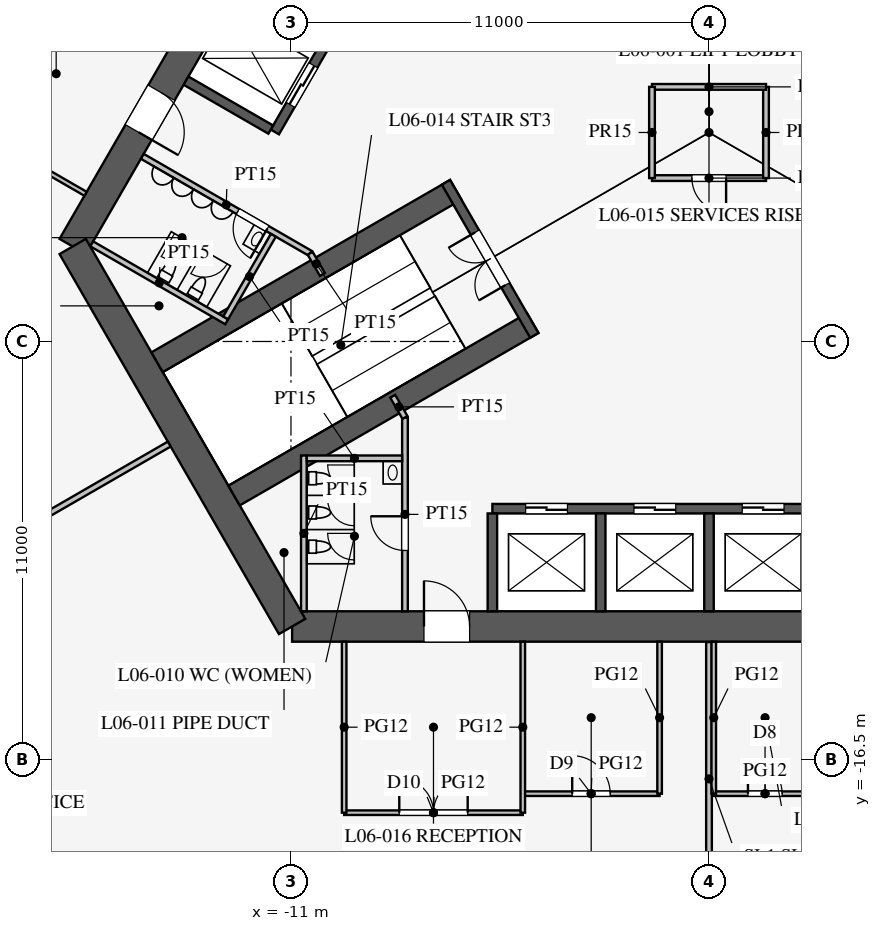
"""IFC4 building model, lengths in metres.
Left out: names, types, materials, properties, quantities, classifications, styles, units other than length and angle.
Written with IfcOpenShell. Run it as: python <this file> out.ifc"""

import sys

from ifc_helpers import new_model, si_unit, direction, frame, frame_2d, origin, place, context, subcontext, project, spatial, rectangle, extrude, element, fill, save


model = new_model("IFC4")
c1 = context("Model", 3, precision=1e-05, world=origin(), true_north=direction((0.0, 1.0)))
c2 = subcontext(c1, "Body", "Model", "MODEL_VIEW")
j1 = project(units=[si_unit("LENGTHUNIT", "METRE"), si_unit("PLANEANGLEUNIT", "RADIAN")], contexts=[c1])
p1 = place(None, origin())
s1 = spatial("IfcSite", under=j1, at=p1, CompositionType="ELEMENT")
p2 = place(p1, origin())
s2 = spatial("IfcBuilding", under=s1, at=p2, CompositionType="ELEMENT")
p3 = place(p2, frame((0.0, 0.0, 29.1)))
s3 = spatial("IfcBuildingStorey", under=s2, at=p3, CompositionType="ELEMENT", Elevation=29.1)
p4 = place(p3, frame((-10.97, -13.0, 0.0), z_axis=(0.0, 0.0, 1.0), x_axis=(1.0, 0.0, 0.0)))
e1 = element("IfcWall", 1, at=p4, inside=s3, PredefinedType="SHEAR", context=c2, shape_type="SweptSolid", body=[
    extrude(rectangle(XDim=21.939, YDim=0.8, at=frame_2d((10.97, 0.0))), origin(), (0.0, 0.0, 1.0), 4.2),
])
p5 = place(p4, frame((17.27, 0.0, 0.0)))
e2 = element("IfcOpeningElement", 2, at=p5, cuts=e1, PredefinedType="OPENING", context=c2, shape_type="SweptSolid", body=[
    extrude(rectangle(XDim=1.2, YDim=2.1, at=frame_2d((0.6, 1.05))), frame((0.0, 0.41, 0.0), z_axis=(0.0, -1.0, 0.0), x_axis=(1.0, 0.0, 0.0)), (0.0, 0.0, 1.0), 0.82),
])
p6 = place(p4, frame((3.47, 0.0, 0.0)))
e3 = element("IfcOpeningElement", 3, at=p6, cuts=e1, PredefinedType="OPENING", context=c2, shape_type="SweptSolid", body=[
    extrude(rectangle(XDim=1.2, YDim=2.1, at=frame_2d((0.6, 1.05))), frame((0.0, 0.41, 0.0), z_axis=(0.0, -1.0, 0.0), x_axis=(1.0, 0.0, 0.0)), (0.0, 0.0, 1.0), 0.82),
])
p7 = place(p3, frame((-5.773, 16.0, 0.0), z_axis=(0.0, 0.0, 1.0), x_axis=(-0.500002442456, -0.866023993627, 0.0)))
e4 = element("IfcWall", 4, at=p7, inside=s3, PredefinedType="SHEAR", context=c2, shape_type="SweptSolid", body=[
    extrude(rectangle(XDim=21.939, YDim=0.8, at=frame_2d((10.97, 0.0))), origin(), (0.0, 0.0, 1.0), 4.2),
])
p8 = place(p7, frame((17.27, 0.0, 0.0)))
e5 = element("IfcOpeningElement", 5, at=p8, cuts=e4, PredefinedType="OPENING", context=c2, shape_type="SweptSolid", body=[
    extrude(rectangle(XDim=1.2, YDim=2.1, at=frame_2d((0.6, 1.05))), frame((0.0, 0.41, 0.0), z_axis=(0.0, -1.0, 0.0), x_axis=(1.0, 0.0, 0.0)), (0.0, 0.0, 1.0), 0.82),
])
p9 = place(p7, frame((3.47, 0.0, 0.0)))
e6 = element("IfcOpeningElement", 6, at=p9, cuts=e4, PredefinedType="OPENING", context=c2, shape_type="SweptSolid", body=[
    extrude(rectangle(XDim=1.2, YDim=2.1, at=frame_2d((0.6, 1.05))), frame((0.0, 0.41, 0.0), z_axis=(0.0, -1.0, 0.0), x_axis=(1.0, 0.0, 0.0)), (0.0, 0.0, 1.0), 0.82),
])
p10 = place(p3, frame((-16.743, -3.0, 0.0), z_axis=(0.0, 0.0, 1.0), x_axis=(0.499995765644, -0.866027848477, 0.0)))
e7 = element("IfcWall", 7, at=p10, inside=s3, PredefinedType="SHEAR", context=c2, shape_type="SweptSolid", body=[
    extrude(rectangle(XDim=11.547, YDim=0.8, at=frame_2d((5.773, 0.0))), origin(), (0.0, 0.0, 1.0), 4.2),
])
p11 = place(p3, frame((-5.7, -9.9, 0.0), z_axis=(0.0, 0.0, 1.0), x_axis=(1.0, 0.0, 0.0)))
e8 = element("IfcWall", 8, at=p11, inside=s3, PredefinedType="SHEAR", context=c2, shape_type="SweptSolid", body=[
    extrude(rectangle(XDim=11.4, YDim=0.25, at=frame_2d((5.7, 0.0))), origin(), (0.0, 0.0, 1.0), 4.2),
])
p12 = place(p11, frame((0.875, 0.0, 0.0)))
e9 = element("IfcOpeningElement", 9, at=p12, cuts=e8, PredefinedType="OPENING", context=c2, shape_type="SweptSolid", body=[
    extrude(rectangle(XDim=1.1, YDim=2.2, at=frame_2d((0.55, 1.1))), frame((0.0, 0.135, 0.0), z_axis=(0.0, -1.0, 0.0), x_axis=(1.0, 0.0, 0.0)), (0.0, 0.0, 1.0), 0.27),
])
p13 = place(p11, frame((3.725, 0.0, 0.0)))
e10 = element("IfcOpeningElement", 10, at=p13, cuts=e8, PredefinedType="OPENING", context=c2, shape_type="SweptSolid", body=[
    extrude(rectangle(XDim=1.1, YDim=2.2, at=frame_2d((0.55, 1.1))), frame((0.0, 0.135, 0.0), z_axis=(0.0, -1.0, 0.0), x_axis=(1.0, 0.0, 0.0)), (0.0, 0.0, 1.0), 0.27),
])
p14 = place(p11, frame((6.575, 0.0, 0.0)))
e11 = element("IfcOpeningElement", 11, at=p14, cuts=e8, PredefinedType="OPENING", context=c2, shape_type="SweptSolid", body=[
    extrude(rectangle(XDim=1.1, YDim=2.2, at=frame_2d((0.55, 1.1))), frame((0.0, 0.135, 0.0), z_axis=(0.0, -1.0, 0.0), x_axis=(1.0, 0.0, 0.0)), (0.0, 0.0, 1.0), 0.27),
])
p15 = place(p11, frame((9.425, 0.0, 0.0)))
e12 = element("IfcOpeningElement", 12, at=p15, cuts=e8, PredefinedType="OPENING", context=c2, shape_type="SweptSolid", body=[
    extrude(rectangle(XDim=1.1, YDim=2.2, at=frame_2d((0.55, 1.1))), frame((0.0, 0.135, 0.0), z_axis=(0.0, -1.0, 0.0), x_axis=(1.0, 0.0, 0.0)), (0.0, 0.0, 1.0), 0.27),
])
for number, where, z_axis, x_axis in (
    (13, (-5.7, -10.025, 0.0), (0.0, 0.0, 1.0), (0.0, -1.0, 0.0)),
    (14, (-2.85, -10.025, 0.0), (0.0, 0.0, 1.0), (0.0, -1.0, 0.0)),
    (15, (0.0, -10.025, 0.0), (0.0, 0.0, 1.0), (0.0, -1.0, 0.0)),
):
    element("IfcWall", number, at=place(p3, frame(where, z_axis=z_axis, x_axis=x_axis)), inside=s3, PredefinedType="SHEAR", context=c2, shape_type="SweptSolid", body=[
        extrude(rectangle(XDim=2.575, YDim=0.25, at=frame_2d((1.288, 0.0))), origin(), (0.0, 0.0, 1.0), 4.2),
    ])
p16 = place(p3, frame((-5.724, 9.886, 0.0), z_axis=(0.0, 0.0, 1.0), x_axis=(-0.500001763848, -0.866024385424, 0.0)))
e16 = element("IfcWall", 16, at=p16, inside=s3, PredefinedType="SHEAR", context=c2, shape_type="SweptSolid", body=[
    extrude(rectangle(XDim=11.4, YDim=0.25, at=frame_2d((5.7, 0.0))), origin(), (0.0, 0.0, 1.0), 4.2),
])
p17 = place(p16, frame((6.525, 0.0, 0.0)))
e17 = element("IfcOpeningElement", 17, at=p17, cuts=e16, PredefinedType="OPENING", context=c2, shape_type="SweptSolid", body=[
    extrude(rectangle(XDim=1.2, YDim=2.2, at=frame_2d((0.6, 1.1))), frame((0.0, 0.135, 0.0), z_axis=(0.0, -1.0, 0.0), x_axis=(1.0, 0.0, 0.0)), (0.0, 0.0, 1.0), 0.27),
])
p18 = place(p16, frame((9.375, 0.0, 0.0)))
e18 = element("IfcOpeningElement", 18, at=p18, cuts=e16, PredefinedType="OPENING", context=c2, shape_type="SweptSolid", body=[
    extrude(rectangle(XDim=1.2, YDim=2.2, at=frame_2d((0.6, 1.1))), frame((0.0, 0.135, 0.0), z_axis=(0.0, -1.0, 0.0), x_axis=(1.0, 0.0, 0.0)), (0.0, 0.0, 1.0), 0.27),
])
p19 = place(p3, frame((-11.532, 0.076, 0.0), z_axis=(0.0, 0.0, 1.0), x_axis=(-0.866005588531, 0.500034319456, 0.0)))
e19 = element("IfcWall", 19, at=p19, inside=s3, PredefinedType="SHEAR", context=c2, shape_type="SweptSolid", body=[
    extrude(rectangle(XDim=2.575, YDim=0.25, at=frame_2d((1.288, 0.0))), origin(), (0.0, 0.0, 1.0), 4.2),
])
for number, where, z_axis, x_axis in (
    (20, (-6.663, -1.509, 0.0), (0.0, 0.0, 1.0), (-0.866, -0.5, 0.0)),
    (21, (-4.638, -5.016, 0.0), (0.0, 0.0, 1.0), (-0.866, -0.5, 0.0)),
):
    element("IfcWall", number, at=place(p3, frame(where, z_axis=z_axis, x_axis=x_axis)), inside=s3, PredefinedType="SHEAR", context=c2, shape_type="SweptSolid", body=[
        extrude(rectangle(XDim=9.075, YDim=0.6, at=frame_2d((4.538, 0.0))), origin(), (0.0, 0.0, 1.0), 4.2),
    ])
p20 = place(p3, frame((-6.922, -1.312, 0.0), z_axis=(0.0, 0.0, 1.0), x_axis=(0.499984536904, -0.866034331223, 0.0)))
e22 = element("IfcWall", 22, at=p20, inside=s3, PredefinedType="SHEAR", context=c2, shape_type="SweptSolid", body=[
    extrude(rectangle(XDim=4.65, YDim=0.25, at=frame_2d((2.325, 0.0))), origin(), (0.0, 0.0, 1.0), 4.2),
])
p21 = place(p20, frame((1.525, 0.0, 0.0)))
e23 = element("IfcOpeningElement", 23, at=p21, cuts=e22, PredefinedType="OPENING", context=c2, shape_type="SweptSolid", body=[
    extrude(rectangle(XDim=1.6, YDim=2.1, at=frame_2d((0.8, 1.05))), frame((0.0, 0.135, 0.0), z_axis=(0.0, -1.0, 0.0), x_axis=(1.0, 0.0, 0.0)), (0.0, 0.0, 1.0), 0.27),
])
p22 = place(p3, frame((-8.0, -7.5, 0.0), z_axis=(0.0, 0.0, 1.0), x_axis=(0.0, -1.0, 0.0)))
e24 = element("IfcWall", 24, at=p22, inside=s3, PredefinedType="PARTITIONING", context=c2, shape_type="SweptSolid", body=[
    extrude(rectangle(XDim=5.1, YDim=0.15, at=frame_2d((2.55, 0.0))), origin(), (0.0, 0.0, 1.0), 4.0),
])
p23 = place(p22, frame((2.6, 0.0, 0.0)))
e25 = element("IfcOpeningElement", 25, at=p23, cuts=e24, PredefinedType="OPENING", context=c2, shape_type="SweptSolid", body=[
    extrude(rectangle(XDim=0.9, YDim=2.1, at=frame_2d((0.45, 1.05))), frame((0.0, 0.085, 0.0), z_axis=(0.0, -1.0, 0.0), x_axis=(1.0, 0.0, 0.0)), (0.0, 0.0, 1.0), 0.17),
])
p24 = place(p3, frame((-10.495, -3.178, 0.0), z_axis=(0.0, 0.0, 1.0), x_axis=(-0.86602216432, 0.500005610874, 0.0)))
e26 = element("IfcWall", 26, at=p24, inside=s3, PredefinedType="PARTITIONING", context=c2, shape_type="SweptSolid", body=[
    extrude(rectangle(XDim=5.1, YDim=0.15, at=frame_2d((2.55, 0.0))), origin(), (0.0, 0.0, 1.0), 4.0),
])
p25 = place(p24, frame((1.3, 0.0, 0.0)))
e27 = element("IfcOpeningElement", 27, at=p25, cuts=e26, PredefinedType="OPENING", context=c2, shape_type="SweptSolid", body=[
    extrude(rectangle(XDim=0.9, YDim=2.1, at=frame_2d((0.45, 1.05))), frame((0.0, 0.085, 0.0), z_axis=(0.0, -1.0, 0.0), x_axis=(1.0, 0.0, 0.0)), (0.0, 0.0, 1.0), 0.17),
])
for number, where, z_axis, x_axis in (
    (28, (-10.495, -3.178, 0.0), (0.0, 0.0, 1.0), (0.5, -0.866, 0.0)),
    (29, (-8.0, -7.5, 0.0), (0.0, 0.0, 1.0), (-0.5, 0.866, 0.0)),
):
    element("IfcWall", number, at=place(p3, frame(where, z_axis=z_axis, x_axis=x_axis)), inside=s3, PredefinedType="PARTITIONING", context=c2, shape_type="SweptSolid", body=[
        extrude(rectangle(XDim=0.645, YDim=0.15, at=frame_2d((0.323, 0.0))), origin(), (0.0, 0.0, 1.0), 4.0),
    ])
p26 = place(p3, frame((-12.691, -4.982, 0.0), z_axis=(0.0, 0.0, 1.0), x_axis=(-0.8660249478, 0.500000789788, 0.0)))
e30 = element("IfcWall", 30, at=p26, inside=s3, PredefinedType="PARTITIONING", context=c2, shape_type="SweptSolid", body=[
    extrude(rectangle(XDim=4.1, YDim=0.15, at=frame_2d((2.05, 0.0))), origin(), (0.0, 0.0, 1.0), 4.0),
])
p27 = place(p3, frame((-11.464, -2.706, 0.0), z_axis=(0.0, 0.0, 1.0), x_axis=(-0.50001992892, -0.866013897511, 0.0)))
e31 = element("IfcWall", 31, at=p27, inside=s3, PredefinedType="PARTITIONING", context=c2, shape_type="SweptSolid", body=[
    extrude(rectangle(XDim=2.51, YDim=0.15, at=frame_2d((1.255, 0.0))), origin(), (0.0, 0.0, 1.0), 4.0),
])
p28 = place(p3, frame((-10.66, -8.5, 0.0), z_axis=(0.0, 0.0, 1.0), x_axis=(0.0, -1.0, 0.0)))
e32 = element("IfcWall", 32, at=p28, inside=s3, PredefinedType="PARTITIONING", context=c2, shape_type="SweptSolid", body=[
    extrude(rectangle(XDim=4.1, YDim=0.15, at=frame_2d((2.05, 0.0))), origin(), (0.0, 0.0, 1.0), 4.0),
])
p29 = place(p3, frame((-8.075, -8.575, 0.0), z_axis=(0.0, 0.0, 1.0), x_axis=(-1.0, 0.0, 0.0)))
e33 = element("IfcWall", 33, at=p29, inside=s3, PredefinedType="PARTITIONING", context=c2, shape_type="SweptSolid", body=[
    extrude(rectangle(XDim=2.51, YDim=0.15, at=frame_2d((1.255, 0.0))), origin(), (0.0, 0.0, 1.0), 4.0),
])
p30 = place(p3, frame((-1.5, -1.2, 0.0), z_axis=(0.0, 0.0, 1.0), x_axis=(1.0, 0.0, 0.0)))
e34 = element("IfcWall", 34, at=p30, inside=s3, PredefinedType="PARTITIONING", context=c2, shape_type="SweptSolid", body=[
    extrude(rectangle(XDim=3.0, YDim=0.15, at=frame_2d((1.5, 0.0))), origin(), (0.0, 0.0, 1.0), 4.0),
])
p31 = place(p30, frame((1.05, 0.0, 0.0)))
e35 = element("IfcOpeningElement", 35, at=p31, cuts=e34, PredefinedType="OPENING", context=c2, shape_type="SweptSolid", body=[
    extrude(rectangle(XDim=0.9, YDim=2.1, at=frame_2d((0.45, 1.05))), frame((0.0, 0.085, 0.0), z_axis=(0.0, -1.0, 0.0), x_axis=(1.0, 0.0, 0.0)), (0.0, 0.0, 1.0), 0.17),
])
p32 = place(p3, frame((1.5, -1.2, 0.0), z_axis=(0.0, 0.0, 1.0), x_axis=(0.0, 1.0, 0.0)))
e36 = element("IfcWall", 36, at=p32, inside=s3, PredefinedType="PARTITIONING", context=c2, shape_type="SweptSolid", body=[
    extrude(rectangle(XDim=2.4, YDim=0.15, at=frame_2d((1.2, 0.0))), origin(), (0.0, 0.0, 1.0), 4.0),
])
p33 = place(p3, frame((1.5, 1.2, 0.0), z_axis=(0.0, 0.0, 1.0), x_axis=(-1.0, 0.0, 0.0)))
e37 = element("IfcWall", 37, at=p33, inside=s3, PredefinedType="PARTITIONING", context=c2, shape_type="SweptSolid", body=[
    extrude(rectangle(XDim=3.0, YDim=0.15, at=frame_2d((1.5, 0.0))), origin(), (0.0, 0.0, 1.0), 4.0),
])
p34 = place(p3, frame((-1.5, 1.2, 0.0), z_axis=(0.0, 0.0, 1.0), x_axis=(0.0, -1.0, 0.0)))
e38 = element("IfcWall", 38, at=p34, inside=s3, PredefinedType="PARTITIONING", context=c2, shape_type="SweptSolid", body=[
    extrude(rectangle(XDim=2.4, YDim=0.15, at=frame_2d((1.2, 0.0))), origin(), (0.0, 0.0, 1.0), 4.0),
])
p35 = place(p3, frame((-14.203, -8.2, 0.0), z_axis=(0.0, 0.0, 1.0), x_axis=(-0.866024965723, -0.500000758745, 0.0)))
e39 = element("IfcWall", 39, at=p35, inside=s3, PredefinedType="PARTITIONING", context=c2, shape_type="SweptSolid", body=[
    extrude(rectangle(XDim=18.25, YDim=0.15, at=frame_2d((9.125, 0.0))), origin(), (0.0, 0.0, 1.0), 2.3),
])
p36 = place(p3, frame((0.0, -13.41, 0.0), z_axis=(0.0, 0.0, 1.0), x_axis=(0.0, -1.0, 0.0)))
e40 = element("IfcWall", 40, at=p36, inside=s3, PredefinedType="PARTITIONING", context=c2, shape_type="SweptSolid", body=[
    extrude(rectangle(XDim=12.759, YDim=0.15, at=frame_2d((6.379, 0.0))), origin(), (0.0, 0.0, 1.0), 3.2),
])
p37 = place(p3, frame((0.125, -17.4, 0.0), z_axis=(0.0, 0.0, 1.0), x_axis=(1.0, 0.0, 0.0)))
e41 = element("IfcWall", 41, at=p37, inside=s3, PredefinedType="PARTITIONING", context=c2, shape_type="SweptSolid", body=[
    extrude(rectangle(XDim=2.7, YDim=0.12, at=frame_2d((1.35, 0.0))), origin(), (0.0, 0.0, 1.0), 2.9),
])
p38 = place(p37, frame((0.9, 0.0, 0.15)))
e42 = element("IfcOpeningElement", 42, at=p38, cuts=e41, PredefinedType="OPENING", context=c2, shape_type="SweptSolid", body=[
    extrude(rectangle(XDim=0.9, YDim=2.1, at=frame_2d((0.45, 1.05))), frame((0.0, 0.07, 0.0), z_axis=(0.0, -1.0, 0.0), x_axis=(1.0, 0.0, 0.0)), (0.0, 0.0, 1.0), 0.14),
])
p39 = place(p3, frame((-4.9, -17.4, 0.0), z_axis=(0.0, 0.0, 1.0), x_axis=(1.0, 0.0, 0.0)))
e43 = element("IfcWall", 43, at=p39, inside=s3, PredefinedType="PARTITIONING", context=c2, shape_type="SweptSolid", body=[
    extrude(rectangle(XDim=3.6, YDim=0.12, at=frame_2d((1.8, 0.0))), origin(), (0.0, 0.0, 1.0), 2.9),
])
p40 = place(p39, frame((1.3, 0.0, 0.15)))
e44 = element("IfcOpeningElement", 44, at=p40, cuts=e43, PredefinedType="OPENING", context=c2, shape_type="SweptSolid", body=[
    extrude(rectangle(XDim=1.0, YDim=2.1, at=frame_2d((0.5, 1.05))), frame((0.0, 0.07, 0.0), z_axis=(0.0, -1.0, 0.0), x_axis=(1.0, 0.0, 0.0)), (0.0, 0.0, 1.0), 0.14),
])
p41 = place(p3, frame((-9.6, -17.9, 0.0), z_axis=(0.0, 0.0, 1.0), x_axis=(1.0, 0.0, 0.0)))
e45 = element("IfcWall", 45, at=p41, inside=s3, PredefinedType="PARTITIONING", context=c2, shape_type="SweptSolid", body=[
    extrude(rectangle(XDim=4.7, YDim=0.12, at=frame_2d((2.35, 0.0))), origin(), (0.0, 0.0, 1.0), 2.9),
])
p42 = place(p41, frame((1.45, 0.0, 0.15)))
e46 = element("IfcOpeningElement", 46, at=p42, cuts=e45, PredefinedType="OPENING", context=c2, shape_type="SweptSolid", body=[
    extrude(rectangle(XDim=1.8, YDim=2.1, at=frame_2d((0.9, 1.05))), frame((0.0, 0.07, 0.0), z_axis=(0.0, -1.0, 0.0), x_axis=(1.0, 0.0, 0.0)), (0.0, 0.0, 1.0), 0.14),
])
for number, where, z_axis, x_axis in (
    (47, (0.125, -13.4, 0.0), (0.0, 0.0, 1.0), (0.0, -1.0, 0.0)),
    (48, (-1.3, -13.4, 0.0), (0.0, 0.0, 1.0), (0.0, -1.0, 0.0)),
):
    element("IfcWall", number, at=place(p3, frame(where, z_axis=z_axis, x_axis=x_axis)), inside=s3, PredefinedType="PARTITIONING", context=c2, shape_type="SweptSolid", body=[
        extrude(rectangle(XDim=4.0, YDim=0.12, at=frame_2d((2.0, 0.0))), origin(), (0.0, 0.0, 1.0), 2.9),
    ])
for number, where, z_axis, x_axis in (
    (49, (-4.9, -13.4, 0.0), (0.0, 0.0, 1.0), (0.0, -1.0, 0.0)),
    (50, (-9.6, -13.4, 0.0), (0.0, 0.0, 1.0), (0.0, -1.0, 0.0)),
):
    element("IfcWall", number, at=place(p3, frame(where, z_axis=z_axis, x_axis=x_axis)), inside=s3, PredefinedType="PARTITIONING", context=c2, shape_type="SweptSolid", body=[
        extrude(rectangle(XDim=4.5, YDim=0.12, at=frame_2d((2.25, 0.0))), origin(), (0.0, 0.0, 1.0), 2.9),
    ])
p43 = place(p3, frame((-16.405, -1.614, 0.0), z_axis=(0.0, 0.0, 1.0), x_axis=(-0.866017533419, 0.500013631625, 0.0)))
e51 = element("IfcWall", 51, at=p43, inside=s3, PredefinedType="PARTITIONING", context=c2, shape_type="SweptSolid", body=[
    extrude(rectangle(XDim=4.5, YDim=0.12, at=frame_2d((2.25, 0.0))), origin(), (0.0, 0.0, 1.0), 2.9),
])
p44 = place(p23, frame((0.9, 0.0, 0.0), z_axis=(0.0, 0.0, 1.0), x_axis=(-1.0, 0.0, 0.0)))
e52 = element("IfcDoor", 52, at=p44, inside=s3, OperationType="SINGLE_SWING_RIGHT", PredefinedType="DOOR", context=c2, shape_type="SweptSolid", body=[
    extrude(rectangle(XDim=0.9, YDim=2.1, at=frame_2d((0.45, 1.05))), frame((0.0, 0.025, 0.0), z_axis=(0.0, -1.0, 0.0), x_axis=(1.0, 0.0, 0.0)), (0.0, 0.0, 1.0), 0.05),
])
fill(e25, e52)
p45 = place(p25, origin())
e53 = element("IfcDoor", 53, at=p45, inside=s3, OperationType="SINGLE_SWING_LEFT", PredefinedType="DOOR", context=c2, shape_type="SweptSolid", body=[
    extrude(rectangle(XDim=0.9, YDim=2.1, at=frame_2d((0.45, 1.05))), frame((0.0, 0.025, 0.0), z_axis=(0.0, -1.0, 0.0), x_axis=(1.0, 0.0, 0.0)), (0.0, 0.0, 1.0), 0.05),
])
fill(e27, e53)
p46 = place(p31, frame((0.9, 0.0, 0.0), z_axis=(0.0, 0.0, 1.0), x_axis=(-1.0, 0.0, 0.0)))
e54 = element("IfcDoor", 54, at=p46, inside=s3, OperationType="SINGLE_SWING_LEFT", PredefinedType="DOOR", context=c2, shape_type="SweptSolid", body=[
    extrude(rectangle(XDim=0.9, YDim=2.1, at=frame_2d((0.45, 1.05))), frame((0.0, 0.025, 0.0), z_axis=(0.0, -1.0, 0.0), x_axis=(1.0, 0.0, 0.0)), (0.0, 0.0, 1.0), 0.05),
])
fill(e35, e54)
p47 = place(p21, frame((1.6, 0.0, 0.0), z_axis=(0.0, 0.0, 1.0), x_axis=(-1.0, 0.0, 0.0)))
e55 = element("IfcDoor", 55, at=p47, inside=s3, OperationType="DOUBLE_DOOR_SINGLE_SWING", PredefinedType="DOOR", context=c2, shape_type="SweptSolid", body=[
    extrude(rectangle(XDim=1.6, YDim=2.1, at=frame_2d((0.8, 1.05))), frame((0.0, 0.025, 0.0), z_axis=(0.0, -1.0, 0.0), x_axis=(1.0, 0.0, 0.0)), (0.0, 0.0, 1.0), 0.05),
])
fill(e23, e55)
p48 = place(p6, origin())
e56 = element("IfcDoor", 56, at=p48, inside=s3, OperationType="SINGLE_SWING_LEFT", PredefinedType="DOOR", context=c2, shape_type="SweptSolid", body=[
    extrude(rectangle(XDim=1.2, YDim=2.1, at=frame_2d((0.6, 1.05))), frame((0.0, 0.025, 0.0), z_axis=(0.0, -1.0, 0.0), x_axis=(1.0, 0.0, 0.0)), (0.0, 0.0, 1.0), 0.05),
])
fill(e3, e56)
p49 = place(p8, origin())
e57 = element("IfcDoor", 57, at=p49, inside=s3, OperationType="SINGLE_SWING_RIGHT", PredefinedType="DOOR", context=c2, shape_type="SweptSolid", body=[
    extrude(rectangle(XDim=1.2, YDim=2.1, at=frame_2d((0.6, 1.05))), frame((0.0, 0.025, 0.0), z_axis=(0.0, -1.0, 0.0), x_axis=(1.0, 0.0, 0.0)), (0.0, 0.0, 1.0), 0.05),
])
fill(e5, e57)
p50 = place(p42, origin())
e58 = element("IfcDoor", 58, at=p50, inside=s3, OperationType="DOUBLE_DOOR_SINGLE_SWING", PredefinedType="DOOR", context=c2, shape_type="SweptSolid", body=[
    extrude(rectangle(XDim=1.8, YDim=2.1, at=frame_2d((0.9, 1.05))), frame((0.0, 0.025, 0.0), z_axis=(0.0, -1.0, 0.0), x_axis=(1.0, 0.0, 0.0)), (0.0, 0.0, 1.0), 0.05),
])
fill(e46, e58)
p51 = place(p40, origin())
e59 = element("IfcDoor", 59, at=p51, inside=s3, OperationType="SINGLE_SWING_LEFT", PredefinedType="DOOR", context=c2, shape_type="SweptSolid", body=[
    extrude(rectangle(XDim=1.0, YDim=2.1, at=frame_2d((0.5, 1.05))), frame((0.0, 0.025, 0.0), z_axis=(0.0, -1.0, 0.0), x_axis=(1.0, 0.0, 0.0)), (0.0, 0.0, 1.0), 0.05),
])
fill(e44, e59)
p52 = place(p38, origin())
e60 = element("IfcDoor", 60, at=p52, inside=s3, OperationType="SINGLE_SWING_LEFT", PredefinedType="DOOR", context=c2, shape_type="SweptSolid", body=[
    extrude(rectangle(XDim=0.9, YDim=2.1, at=frame_2d((0.45, 1.05))), frame((0.0, 0.025, 0.0), z_axis=(0.0, -1.0, 0.0), x_axis=(1.0, 0.0, 0.0)), (0.0, 0.0, 1.0), 0.05),
])
fill(e42, e60)
p53 = place(p12, origin())
e61 = element("IfcDoor", 61, at=p53, inside=s3, OperationType="DOUBLE_DOOR_SLIDING", PredefinedType="DOOR", context=c2, shape_type="SweptSolid", body=[
    extrude(rectangle(XDim=1.1, YDim=2.2, at=frame_2d((0.55, 1.1))), frame((0.0, 0.025, 0.0), z_axis=(0.0, -1.0, 0.0), x_axis=(1.0, 0.0, 0.0)), (0.0, 0.0, 1.0), 0.05),
])
fill(e9, e61)
p54 = place(p13, origin())
e62 = element("IfcDoor", 62, at=p54, inside=s3, OperationType="DOUBLE_DOOR_SLIDING", PredefinedType="DOOR", context=c2, shape_type="SweptSolid", body=[
    extrude(rectangle(XDim=1.1, YDim=2.2, at=frame_2d((0.55, 1.1))), frame((0.0, 0.025, 0.0), z_axis=(0.0, -1.0, 0.0), x_axis=(1.0, 0.0, 0.0)), (0.0, 0.0, 1.0), 0.05),
])
fill(e10, e62)
p55 = place(p14, origin())
e63 = element("IfcDoor", 63, at=p55, inside=s3, OperationType="DOUBLE_DOOR_SLIDING", PredefinedType="DOOR", context=c2, shape_type="SweptSolid", body=[
    extrude(rectangle(XDim=1.1, YDim=2.2, at=frame_2d((0.55, 1.1))), frame((0.0, 0.025, 0.0), z_axis=(0.0, -1.0, 0.0), x_axis=(1.0, 0.0, 0.0)), (0.0, 0.0, 1.0), 0.05),
])
fill(e11, e63)
p56 = place(p18, origin())
e64 = element("IfcDoor", 64, at=p56, inside=s3, OperationType="DOUBLE_DOOR_SLIDING", PredefinedType="DOOR", context=c2, shape_type="SweptSolid", body=[
    extrude(rectangle(XDim=1.2, YDim=2.2, at=frame_2d((0.6, 1.1))), frame((0.0, 0.025, 0.0), z_axis=(0.0, -1.0, 0.0), x_axis=(1.0, 0.0, 0.0)), (0.0, 0.0, 1.0), 0.05),
])
fill(e18, e64)
save(model, sys.argv[1])
